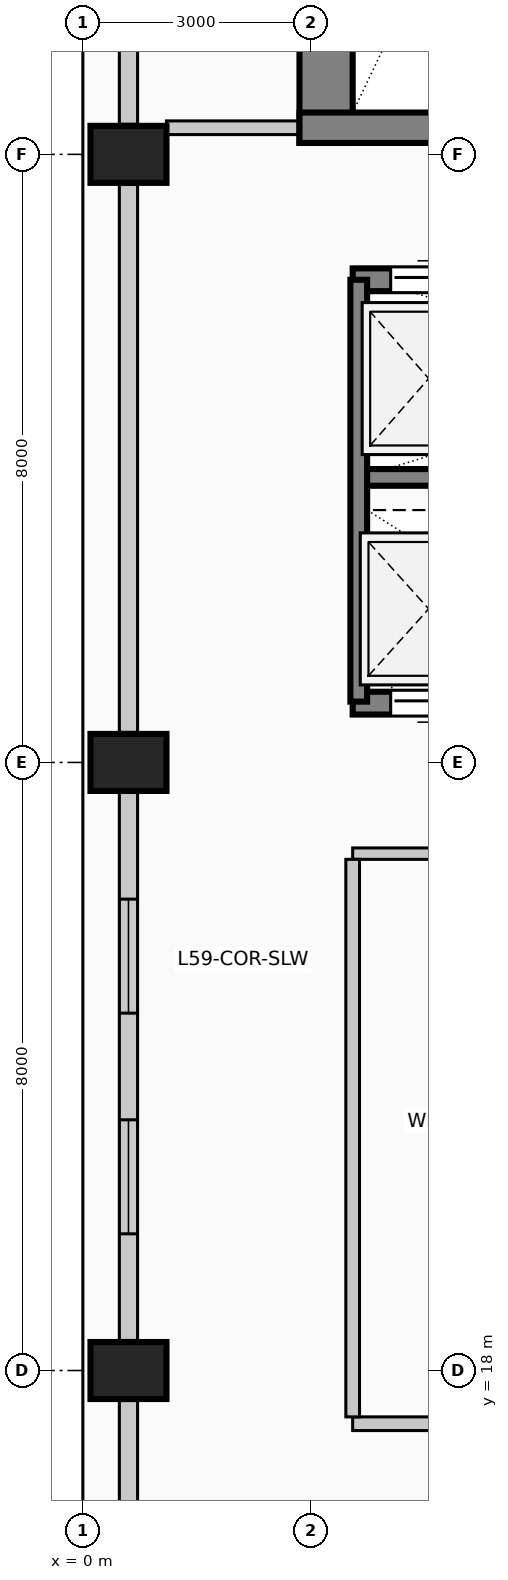
"""IFC4 building model, lengths in metres.
Left out: names, types, materials, properties, quantities, classifications, styles, units other than length and angle.
Written with IfcOpenShell. Run it as: python <this file> out.ifc"""

import sys

from ifc_helpers import new_model, si_unit, direction, frame, frame_2d, origin, origin_2d, place, context, subcontext, project, spatial, rectangle, extrude, element, fill, save


model = new_model("IFC4")
c1 = context("Model", 3, precision=1e-05, world=origin(), true_north=direction((0.0, 1.0)))
c2 = subcontext(c1, "Body", "Model", "MODEL_VIEW")
j1 = project(units=[si_unit("LENGTHUNIT", "METRE"), si_unit("PLANEANGLEUNIT", "RADIAN")], contexts=[c1])
p1 = place(None, origin())
s1 = spatial("IfcSite", under=j1, at=p1, CompositionType="ELEMENT")
p2 = place(p1, origin())
s2 = spatial("IfcBuilding", under=s1, at=p2, CompositionType="ELEMENT")
p3 = place(p2, frame((0.0, 0.0, 243.8)))
s3 = spatial("IfcBuildingStorey", under=s2, at=p3, CompositionType="ELEMENT", Elevation=243.8)
p4 = place(p3, frame((3.2, 34.15, 0.0), z_axis=(0.0, 0.0, 1.0), x_axis=(0.0, 1.0, 0.0)))
e1 = element("IfcWall", 1, at=p4, inside=s3, PredefinedType="SHEAR", context=c2, shape_type="SweptSolid", body=[
    extrude(rectangle(XDim=8.98, YDim=0.7, at=frame_2d((4.49, 0.0))), origin(), (0.0, 0.0, 1.0), 4.8),
])
p5 = place(p3, frame((2.85, 34.35, 0.0), z_axis=(0.0, 0.0, 1.0), x_axis=(1.0, 0.0, 0.0)))
e2 = element("IfcWall", 2, at=p5, inside=s3, PredefinedType="SHEAR", context=c2, shape_type="SweptSolid", body=[
    extrude(rectangle(XDim=4.86, YDim=0.4, at=frame_2d((2.43, 0.0))), origin(), (0.0, 0.0, 1.0), 4.8),
])
p6 = place(p5, frame((2.4, 0.0, 0.0)))
e3 = element("IfcOpeningElement", 3, at=p6, cuts=e2, PredefinedType="OPENING", context=c2, shape_type="SweptSolid", body=[
    extrude(rectangle(XDim=1.15, YDim=2.2, at=frame_2d((0.575, 1.1))), frame((0.0, 0.21, 0.0), z_axis=(0.0, -1.0, 0.0), x_axis=(1.0, 0.0, 0.0)), (0.0, 0.0, 1.0), 0.42),
])
for number, where, z_axis, x_axis in (
    (4, (0.6, 18.0, 0.0), (0.0, 0.0, 1.0), (0.0, 1.0, 0.0)),
    (5, (0.6, 26.0, 0.0), (0.0, 0.0, 1.0), (0.0, 1.0, 0.0)),
    (6, (0.6, 34.0, 0.0), (0.0, 0.0, 1.0), (0.0, 1.0, 0.0)),
):
    element("IfcColumn", number, at=place(p3, frame(where, z_axis=z_axis, x_axis=x_axis)), inside=s3, PredefinedType="COLUMN", context=c2, shape_type="SweptSolid", body=[
        extrude(rectangle(XDim=0.75, YDim=1.0, at=origin_2d()), origin(), (0.0, 0.0, 1.0), 4.8),
    ])
p7 = place(p3, frame((0.6, 10.395, 0.0), z_axis=(0.0, 0.0, 1.0), x_axis=(0.0, 1.0, 0.0)))
e7 = element("IfcWall", 7, at=p7, inside=s3, PredefinedType="SOLIDWALL", context=c2, shape_type="SweptSolid", body=[
    extrude(rectangle(XDim=7.21, YDim=0.24, at=frame_2d((3.605, 0.0))), origin(), (0.0, 0.0, 1.0), 3.8),
])
p8 = place(p7, frame((1.403, 0.0, 0.42)))
e8 = element("IfcOpeningElement", 8, at=p8, cuts=e7, PredefinedType="OPENING", context=c2, shape_type="SweptSolid", body=[
    extrude(rectangle(XDim=1.5, YDim=2.2, at=frame_2d((0.75, 1.1))), frame((0.0, 0.13, 0.0), z_axis=(0.0, -1.0, 0.0), x_axis=(1.0, 0.0, 0.0)), (0.0, 0.0, 1.0), 0.26),
])
p9 = place(p3, frame((0.6, 18.395, 0.0), z_axis=(0.0, 0.0, 1.0), x_axis=(0.0, 1.0, 0.0)))
e9 = element("IfcWall", 9, at=p9, inside=s3, PredefinedType="SOLIDWALL", context=c2, shape_type="SweptSolid", body=[
    extrude(rectangle(XDim=7.21, YDim=0.24, at=frame_2d((3.605, 0.0))), origin(), (0.0, 0.0, 1.0), 3.8),
])
p10 = place(p9, frame((1.403, 0.0, 0.42)))
e10 = element("IfcOpeningElement", 10, at=p10, cuts=e9, PredefinedType="OPENING", context=c2, shape_type="SweptSolid", body=[
    extrude(rectangle(XDim=1.5, YDim=2.2, at=frame_2d((0.75, 1.1))), frame((0.0, 0.13, 0.0), z_axis=(0.0, -1.0, 0.0), x_axis=(1.0, 0.0, 0.0)), (0.0, 0.0, 1.0), 0.26),
])
p11 = place(p9, frame((4.307, 0.0, 0.42)))
e11 = element("IfcOpeningElement", 11, at=p11, cuts=e9, PredefinedType="OPENING", context=c2, shape_type="SweptSolid", body=[
    extrude(rectangle(XDim=1.5, YDim=2.2, at=frame_2d((0.75, 1.1))), frame((0.0, 0.13, 0.0), z_axis=(0.0, -1.0, 0.0), x_axis=(1.0, 0.0, 0.0)), (0.0, 0.0, 1.0), 0.26),
])
p12 = place(p3, frame((0.6, 26.395, 0.0), z_axis=(0.0, 0.0, 1.0), x_axis=(0.0, 1.0, 0.0)))
e12 = element("IfcWall", 12, at=p12, inside=s3, PredefinedType="SOLIDWALL", context=c2, shape_type="SweptSolid", body=[
    extrude(rectangle(XDim=7.21, YDim=0.24, at=frame_2d((3.605, 0.0))), origin(), (0.0, 0.0, 1.0), 3.8),
])
p13 = place(p3, frame((0.6, 34.395, 0.0), z_axis=(0.0, 0.0, 1.0), x_axis=(0.0, 1.0, 0.0)))
e13 = element("IfcWall", 13, at=p13, inside=s3, PredefinedType="SOLIDWALL", context=c2, shape_type="SweptSolid", body=[
    extrude(rectangle(XDim=7.61, YDim=0.24, at=frame_2d((3.805, 0.0))), origin(), (0.0, 0.0, 1.0), 3.8),
])
p14 = place(p3, frame((3.55, 32.35, 0.0), z_axis=(0.0, 0.0, 1.0), x_axis=(1.0, 0.0, 0.0)))
e14 = element("IfcWall", 14, at=p14, inside=s3, PredefinedType="SOLIDWALL", context=c2, shape_type="SweptSolid", body=[
    extrude(rectangle(XDim=2.1, YDim=0.3, at=frame_2d((1.05, 0.0))), origin(), (0.0, 0.0, 1.0), 4.8),
])
p15 = place(p14, frame((0.5, 0.0, 0.0)))
e15 = element("IfcOpeningElement", 15, at=p15, cuts=e14, PredefinedType="OPENING", context=c2, shape_type="SweptSolid", body=[
    extrude(rectangle(XDim=1.1, YDim=2.2, at=frame_2d((0.55, 1.1))), frame((0.0, 0.16, 0.0), z_axis=(0.0, -1.0, 0.0), x_axis=(1.0, 0.0, 0.0)), (0.0, 0.0, 1.0), 0.32),
])
p16 = place(p3, frame((5.65, 26.78, 0.0), z_axis=(0.0, 0.0, 1.0), x_axis=(-1.0, 0.0, 0.0)))
e16 = element("IfcWall", 16, at=p16, inside=s3, PredefinedType="SOLIDWALL", context=c2, shape_type="SweptSolid", body=[
    extrude(rectangle(XDim=2.1, YDim=0.3, at=frame_2d((1.05, 0.0))), origin(), (0.0, 0.0, 1.0), 4.8),
])
p17 = place(p16, frame((0.5, 0.0, 0.0)))
e17 = element("IfcOpeningElement", 17, at=p17, cuts=e16, PredefinedType="OPENING", context=c2, shape_type="SweptSolid", body=[
    extrude(rectangle(XDim=1.1, YDim=2.2, at=frame_2d((0.55, 1.1))), frame((0.0, 0.16, 0.0), z_axis=(0.0, -1.0, 0.0), x_axis=(1.0, 0.0, 0.0)), (0.0, 0.0, 1.0), 0.32),
])
p18 = place(p3, frame((3.55, 29.75, 0.0), z_axis=(0.0, 0.0, 1.0), x_axis=(1.0, 0.0, 0.0)))
e18 = element("IfcWall", 18, at=p18, inside=s3, PredefinedType="SOLIDWALL", context=c2, shape_type="SweptSolid", body=[
    extrude(rectangle(XDim=8.65, YDim=0.22, at=frame_2d((4.325, 0.0))), origin(), (0.0, 0.0, 1.0), 4.8),
])
p19 = place(p3, frame((3.63, 26.8, 0.0), z_axis=(0.0, 0.0, 1.0), x_axis=(0.0, 1.0, 0.0)))
e19 = element("IfcWall", 19, at=p19, inside=s3, PredefinedType="SOLIDWALL", context=c2, shape_type="SweptSolid", body=[
    extrude(rectangle(XDim=5.55, YDim=0.22, at=frame_2d((2.775, 0.0))), origin(), (0.0, 0.0, 1.0), 4.8),
])
p20 = place(p3, frame((3.55, 17.3, 0.0), z_axis=(0.0, 0.0, 1.0), x_axis=(1.0, 0.0, 0.0)))
e20 = element("IfcWall", 20, at=p20, inside=s3, PredefinedType="PARTITIONING", context=c2, shape_type="SweptSolid", body=[
    extrude(rectangle(XDim=6.25, YDim=0.18, at=frame_2d((3.125, 0.0))), origin(), (0.0, 0.0, 1.0), 4.55),
])
p21 = place(p20, frame((2.65, 0.0, 0.0)))
e21 = element("IfcOpeningElement", 21, at=p21, cuts=e20, PredefinedType="OPENING", context=c2, shape_type="SweptSolid", body=[
    extrude(rectangle(XDim=0.95, YDim=2.15, at=frame_2d((0.475, 1.075))), frame((0.0, 0.1, 0.0), z_axis=(0.0, -1.0, 0.0), x_axis=(1.0, 0.0, 0.0)), (0.0, 0.0, 1.0), 0.2),
])
p22 = place(p3, frame((3.55, 24.8, 0.0), z_axis=(0.0, 0.0, 1.0), x_axis=(1.0, 0.0, 0.0)))
e22 = element("IfcWall", 22, at=p22, inside=s3, PredefinedType="PARTITIONING", context=c2, shape_type="SweptSolid", body=[
    extrude(rectangle(XDim=6.25, YDim=0.15, at=frame_2d((3.125, 0.0))), origin(), (0.0, 0.0, 1.0), 4.55),
])
p23 = place(p3, frame((1.1, 34.35, 0.0), z_axis=(0.0, 0.0, 1.0), x_axis=(1.0, 0.0, 0.0)))
e23 = element("IfcWall", 23, at=p23, inside=s3, PredefinedType="PARTITIONING", context=c2, shape_type="SweptSolid", body=[
    extrude(rectangle(XDim=1.75, YDim=0.18, at=frame_2d((0.875, 0.0))), origin(), (0.0, 0.0, 1.0), 4.55),
])
p24 = place(p3, frame((3.55, 17.39, 0.0), z_axis=(0.0, 0.0, 1.0), x_axis=(0.0, 1.0, 0.0)))
e24 = element("IfcWall", 24, at=p24, inside=s3, PredefinedType="PARTITIONING", context=c2, shape_type="SweptSolid", body=[
    extrude(rectangle(XDim=7.335, YDim=0.18, at=frame_2d((3.667, 0.0))), origin(), (0.0, 0.0, 1.0), 4.55),
])
p25 = place(p10, origin())
e25 = element("IfcWindow", 25, at=p25, inside=s3, PartitioningType="SINGLE_PANEL", PredefinedType="WINDOW", context=c2, shape_type="SweptSolid", body=[
    extrude(rectangle(XDim=1.5, YDim=2.2, at=frame_2d((0.75, 1.1))), frame((0.0, 0.03, 0.0), z_axis=(0.0, -1.0, 0.0), x_axis=(1.0, 0.0, 0.0)), (0.0, 0.0, 1.0), 0.06),
])
fill(e10, e25)
p26 = place(p11, origin())
e26 = element("IfcWindow", 26, at=p26, inside=s3, PartitioningType="SINGLE_PANEL", PredefinedType="WINDOW", context=c2, shape_type="SweptSolid", body=[
    extrude(rectangle(XDim=1.5, YDim=2.2, at=frame_2d((0.75, 1.1))), frame((0.0, 0.03, 0.0), z_axis=(0.0, -1.0, 0.0), x_axis=(1.0, 0.0, 0.0)), (0.0, 0.0, 1.0), 0.06),
])
fill(e11, e26)
p27 = place(p15, origin())
e27 = element("IfcDoor", 27, at=p27, inside=s3, OperationType="SLIDING_TO_LEFT", PredefinedType="DOOR", context=c2, shape_type="SweptSolid", body=[
    extrude(rectangle(XDim=1.1, YDim=2.2, at=frame_2d((0.55, 1.1))), frame((0.0, 0.025, 0.0), z_axis=(0.0, -1.0, 0.0), x_axis=(1.0, 0.0, 0.0)), (0.0, 0.0, 1.0), 0.05),
])
fill(e15, e27)
p28 = place(p17, origin())
e28 = element("IfcDoor", 28, at=p28, inside=s3, OperationType="SLIDING_TO_LEFT", PredefinedType="DOOR", context=c2, shape_type="SweptSolid", body=[
    extrude(rectangle(XDim=1.1, YDim=2.2, at=frame_2d((0.55, 1.1))), frame((0.0, 0.025, 0.0), z_axis=(0.0, -1.0, 0.0), x_axis=(1.0, 0.0, 0.0)), (0.0, 0.0, 1.0), 0.05),
])
fill(e17, e28)
save(model, sys.argv[1])
